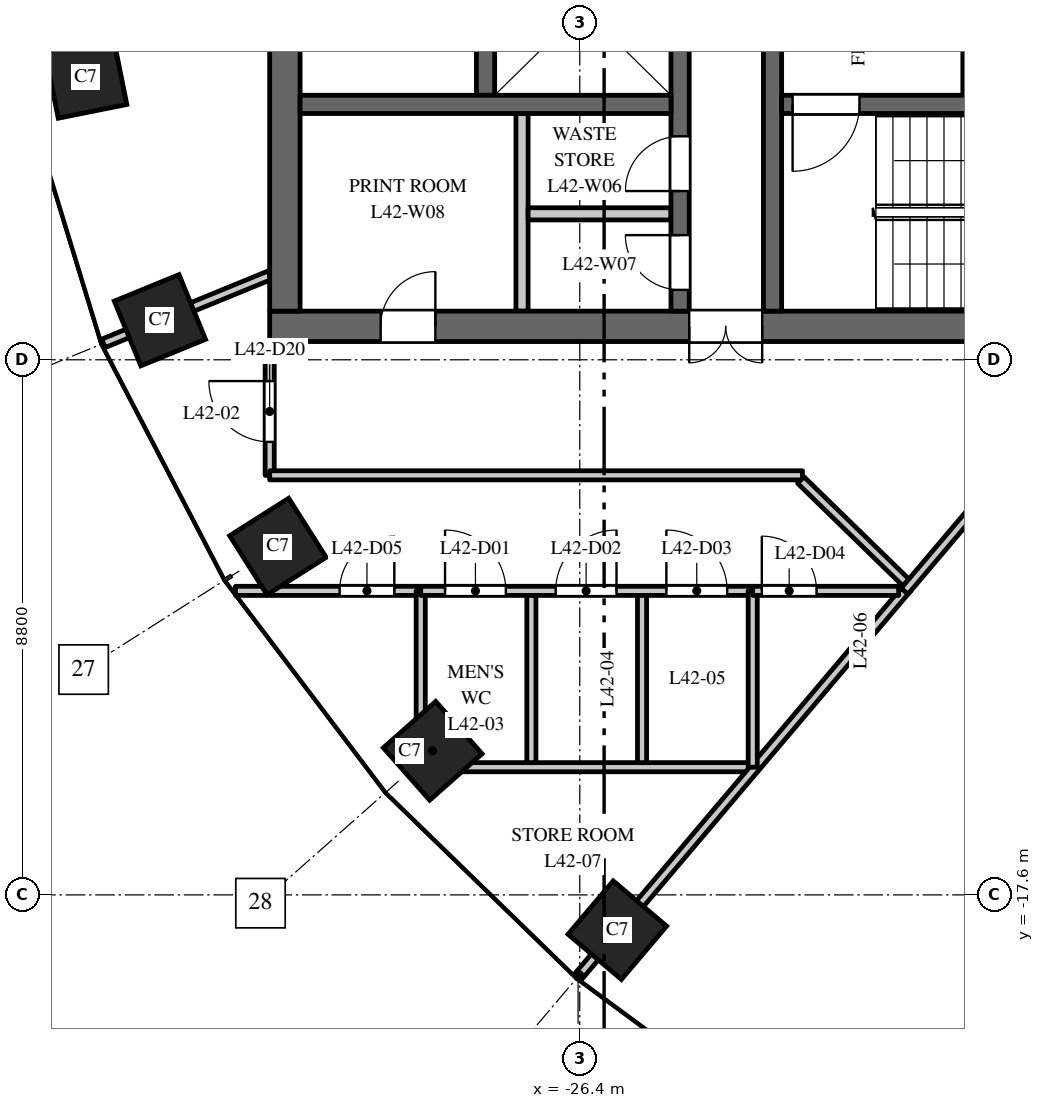
"""IFC4 building model, lengths in metres.
Left out: names, types, materials, properties, quantities, classifications, styles, units other than length and angle.
Written with IfcOpenShell. Run it as: python <this file> out.ifc"""

import sys

from ifc_helpers import new_model, si_unit, direction, frame, frame_2d, origin, origin_2d, place, context, subcontext, project, spatial, rectangle, extrude, element, fill, save


model = new_model("IFC4")
c1 = context("Model", 3, precision=1e-05, world=origin(), true_north=direction((0.0, 1.0)))
c2 = subcontext(c1, "Body", "Model", "MODEL_VIEW")
j1 = project(units=[si_unit("LENGTHUNIT", "METRE"), si_unit("PLANEANGLEUNIT", "RADIAN")], contexts=[c1])
p1 = place(None, origin())
s1 = spatial("IfcSite", under=j1, at=p1, CompositionType="ELEMENT")
p2 = place(p1, origin())
s2 = spatial("IfcBuilding", under=s1, at=p2, CompositionType="ELEMENT")
p3 = place(p2, frame((0.0, 0.0, 182.0)))
s3 = spatial("IfcBuildingStorey", under=s2, at=p3, CompositionType="ELEMENT", Elevation=182.0)
for number, where, z_axis, x_axis in (
    (1, (-34.527, -4.151, 0.0), (0.0, 0.0, 1.0), (0.197, -0.98, 0.0)),
    (2, (-33.305, -8.149, 0.0), (0.0, 0.0, 1.0), (0.379, -0.925, 0.0)),
    (3, (-31.365, -11.871, 0.0), (0.0, 0.0, 1.0), (0.535, -0.845, 0.0)),
    (4, (-28.819, -15.23, 0.0), (0.0, 0.0, 1.0), (0.663, -0.749, 0.0)),
    (5, (-25.783, -18.18, 0.0), (0.0, 0.0, 1.0), (0.763, -0.646, 0.0)),
):
    element("IfcColumn", number, at=place(p3, frame(where, z_axis=z_axis, x_axis=x_axis)), inside=s3, PredefinedType="COLUMN", context=c2, shape_type="SweptSolid", body=[
        extrude(rectangle(XDim=1.15, YDim=1.15, at=origin_2d()), origin(), (0.0, 0.0, 1.0), 4.0),
    ])
p4 = place(p3, frame((-16.5, -8.25, 0.0), z_axis=(0.0, 0.0, 1.0), x_axis=(-1.0, 0.0, 0.0)))
e6 = element("IfcWall", 6, at=p4, inside=s3, PredefinedType="SHEAR", context=c2, shape_type="SweptSolid", body=[
    extrude(rectangle(XDim=15.0, YDim=0.5, at=frame_2d((7.5, 0.0))), origin(), (0.0, 0.0, 1.0), 3.7),
])
p5 = place(p4, frame((6.9, 0.0, 0.0)))
e7 = element("IfcOpeningElement", 7, at=p5, cuts=e6, PredefinedType="OPENING", context=c2, shape_type="SweptSolid", body=[
    extrude(rectangle(XDim=1.2, YDim=2.1, at=frame_2d((0.6, 1.05))), frame((0.0, 0.26, 0.0), z_axis=(0.0, -1.0, 0.0), x_axis=(1.0, 0.0, 0.0)), (0.0, 0.0, 1.0), 0.52),
])
p6 = place(p4, frame((12.275, 0.0, 0.0)))
e8 = element("IfcOpeningElement", 8, at=p6, cuts=e6, PredefinedType="OPENING", context=c2, shape_type="SweptSolid", body=[
    extrude(rectangle(XDim=0.9, YDim=2.1, at=frame_2d((0.45, 1.05))), frame((0.0, 0.26, 0.0), z_axis=(0.0, -1.0, 0.0), x_axis=(1.0, 0.0, 0.0)), (0.0, 0.0, 1.0), 0.52),
])
p7 = place(p3, frame((-27.95, -4.45, 0.0), z_axis=(0.0, 0.0, 1.0), x_axis=(0.0, 1.0, 0.0)))
e9 = element("IfcWall", 9, at=p7, inside=s3, PredefinedType="SHEAR", context=c2, shape_type="SweptSolid", body=[
    extrude(rectangle(XDim=8.9, YDim=0.3, at=frame_2d((4.45, 0.0))), origin(), (0.0, 0.0, 1.0), 3.7),
])
p8 = place(p3, frame((-19.95, -4.45, 0.0), z_axis=(0.0, 0.0, 1.0), x_axis=(0.0, 1.0, 0.0)))
e10 = element("IfcWall", 10, at=p8, inside=s3, PredefinedType="SHEAR", context=c2, shape_type="SweptSolid", body=[
    extrude(rectangle(XDim=8.9, YDim=0.3, at=frame_2d((4.45, 0.0))), origin(), (0.0, 0.0, 1.0), 3.7),
])
p9 = place(p8, frame((0.775, 0.0, 0.0)))
e11 = element("IfcOpeningElement", 11, at=p9, cuts=e10, PredefinedType="OPENING", context=c2, shape_type="SweptSolid", body=[
    extrude(rectangle(XDim=1.2, YDim=2.1, at=frame_2d((0.6, 1.05))), frame((0.0, 0.16, 0.0), z_axis=(0.0, -1.0, 0.0), x_axis=(1.0, 0.0, 0.0)), (0.0, 0.0, 1.0), 0.32),
])
p10 = place(p8, frame((7.25, 0.0, 0.0)))
e12 = element("IfcOpeningElement", 12, at=p10, cuts=e10, PredefinedType="OPENING", context=c2, shape_type="SweptSolid", body=[
    extrude(rectangle(XDim=1.1, YDim=2.1, at=frame_2d((0.55, 1.05))), frame((0.0, 0.16, 0.0), z_axis=(0.0, -1.0, 0.0), x_axis=(1.0, 0.0, 0.0)), (0.0, 0.0, 1.0), 0.32),
])
p11 = place(p3, frame((-24.75, -8.0, 0.0), z_axis=(0.0, 0.0, 1.0), x_axis=(0.0, 1.0, 0.0)))
e13 = element("IfcWall", 13, at=p11, inside=s3, PredefinedType="SHEAR", context=c2, shape_type="SweptSolid", body=[
    extrude(rectangle(XDim=16.0, YDim=0.3, at=frame_2d((8.0, 0.0))), origin(), (0.0, 0.0, 1.0), 3.7),
])
p12 = place(p11, frame((4.425, 0.0, 0.0)))
e14 = element("IfcOpeningElement", 14, at=p12, cuts=e13, PredefinedType="OPENING", context=c2, shape_type="SweptSolid", body=[
    extrude(rectangle(XDim=1.1, YDim=2.1, at=frame_2d((0.55, 1.05))), frame((0.0, 0.16, 0.0), z_axis=(0.0, -1.0, 0.0), x_axis=(1.0, 0.0, 0.0)), (0.0, 0.0, 1.0), 0.32),
])
p13 = place(p11, frame((7.45, 0.0, 0.0)))
e15 = element("IfcOpeningElement", 15, at=p13, cuts=e13, PredefinedType="OPENING", context=c2, shape_type="SweptSolid", body=[
    extrude(rectangle(XDim=1.1, YDim=2.1, at=frame_2d((0.55, 1.05))), frame((0.0, 0.16, 0.0), z_axis=(0.0, -1.0, 0.0), x_axis=(1.0, 0.0, 0.0)), (0.0, 0.0, 1.0), 0.32),
])
p14 = place(p11, frame((10.475, 0.0, 0.0)))
e16 = element("IfcOpeningElement", 16, at=p14, cuts=e13, PredefinedType="OPENING", context=c2, shape_type="SweptSolid", body=[
    extrude(rectangle(XDim=1.1, YDim=2.1, at=frame_2d((0.55, 1.05))), frame((0.0, 0.16, 0.0), z_axis=(0.0, -1.0, 0.0), x_axis=(1.0, 0.0, 0.0)), (0.0, 0.0, 1.0), 0.32),
])
p15 = place(p11, frame((13.75, 0.0, 0.0)))
e17 = element("IfcOpeningElement", 17, at=p15, cuts=e13, PredefinedType="OPENING", context=c2, shape_type="SweptSolid", body=[
    extrude(rectangle(XDim=0.9, YDim=2.1, at=frame_2d((0.45, 1.05))), frame((0.0, 0.16, 0.0), z_axis=(0.0, -1.0, 0.0), x_axis=(1.0, 0.0, 0.0)), (0.0, 0.0, 1.0), 0.32),
])
p16 = place(p11, frame((1.975, 0.0, 0.0)))
e18 = element("IfcOpeningElement", 18, at=p16, cuts=e13, PredefinedType="OPENING", context=c2, shape_type="SweptSolid", body=[
    extrude(rectangle(XDim=0.9, YDim=2.1, at=frame_2d((0.45, 1.05))), frame((0.0, 0.16, 0.0), z_axis=(0.0, -1.0, 0.0), x_axis=(1.0, 0.0, 0.0)), (0.0, 0.0, 1.0), 0.32),
])
p17 = place(p11, frame((0.35, 0.0, 0.0)))
e19 = element("IfcOpeningElement", 19, at=p17, cuts=e13, PredefinedType="OPENING", context=c2, shape_type="SweptSolid", body=[
    extrude(rectangle(XDim=0.9, YDim=2.1, at=frame_2d((0.45, 1.05))), frame((0.0, 0.16, 0.0), z_axis=(0.0, -1.0, 0.0), x_axis=(1.0, 0.0, 0.0)), (0.0, 0.0, 1.0), 0.32),
])
p18 = place(p3, frame((-31.25, -8.0, 0.0), z_axis=(0.0, 0.0, 1.0), x_axis=(0.0, 1.0, 0.0)))
e20 = element("IfcWall", 20, at=p18, inside=s3, PredefinedType="SHEAR", context=c2, shape_type="SweptSolid", body=[
    extrude(rectangle(XDim=16.0, YDim=0.5, at=frame_2d((8.0, 0.0))), origin(), (0.0, 0.0, 1.0), 3.7),
])
p19 = place(p3, frame((-27.35, -8.0, 0.0), z_axis=(0.0, 0.0, 1.0), x_axis=(0.0, 1.0, 0.0)))
e21 = element("IfcWall", 21, at=p19, inside=s3, PredefinedType="PARTITIONING", context=c2, shape_type="SweptSolid", body=[
    extrude(rectangle(XDim=3.25, YDim=0.2, at=frame_2d((1.625, 0.0))), origin(), (0.0, 0.0, 1.0), 3.7),
])
p20 = place(p3, frame((-24.9, -6.4, 0.0), z_axis=(0.0, 0.0, 1.0), x_axis=(-1.0, 0.0, 0.0)))
e22 = element("IfcWall", 22, at=p20, inside=s3, PredefinedType="PARTITIONING", context=c2, shape_type="SweptSolid", body=[
    extrude(rectangle(XDim=2.35, YDim=0.2, at=frame_2d((1.175, 0.0))), origin(), (0.0, 0.0, 1.0), 3.7),
])
p21 = place(p3, frame((-24.9, -4.6, 0.0), z_axis=(0.0, 0.0, 1.0), x_axis=(-1.0, 0.0, 0.0)))
e23 = element("IfcWall", 23, at=p21, inside=s3, PredefinedType="SHEAR", context=c2, shape_type="SweptSolid", body=[
    extrude(rectangle(XDim=6.1, YDim=0.3, at=frame_2d((3.05, 0.0))), origin(), (0.0, 0.0, 1.0), 3.7),
])
p22 = place(p3, frame((-23.23, -8.0, 0.0), z_axis=(0.0, 0.0, 1.0), x_axis=(0.0, 1.0, 0.0)))
e24 = element("IfcWall", 24, at=p22, inside=s3, PredefinedType="SHEAR", context=c2, shape_type="SweptSolid", body=[
    extrude(rectangle(XDim=7.875, YDim=0.3, at=frame_2d((3.938, 0.0))), origin(), (0.0, 0.0, 1.0), 3.7),
])
p23 = place(p22, frame((5.15, 0.0, 0.0)))
e25 = element("IfcOpeningElement", 25, at=p23, cuts=e24, PredefinedType="OPENING", context=c2, shape_type="SweptSolid", body=[
    extrude(rectangle(XDim=1.1, YDim=2.1, at=frame_2d((0.55, 1.05))), frame((0.0, 0.16, 0.0), z_axis=(0.0, -1.0, 0.0), x_axis=(1.0, 0.0, 0.0)), (0.0, 0.0, 1.0), 0.32),
])
p24 = place(p3, frame((-16.9, -4.6, 0.0), z_axis=(0.0, 0.0, 1.0), x_axis=(-1.0, 0.0, 0.0)))
e26 = element("IfcWall", 26, at=p24, inside=s3, PredefinedType="SHEAR", context=c2, shape_type="SweptSolid", body=[
    extrude(rectangle(XDim=6.18, YDim=0.3, at=frame_2d((3.09, 0.0))), origin(), (0.0, 0.0, 1.0), 3.7),
])
p25 = place(p24, frame((4.9, 0.0, 0.0)))
e27 = element("IfcOpeningElement", 27, at=p25, cuts=e26, PredefinedType="OPENING", context=c2, shape_type="SweptSolid", body=[
    extrude(rectangle(XDim=1.1, YDim=2.1, at=frame_2d((0.55, 1.05))), frame((0.0, 0.16, 0.0), z_axis=(0.0, -1.0, 0.0), x_axis=(1.0, 0.0, 0.0)), (0.0, 0.0, 1.0), 0.32),
])
p26 = place(p3, frame((-34.234, -8.53, 0.0), z_axis=(0.0, 0.0, 1.0), x_axis=(0.925344112436, 0.379128307542, 0.0)))
e28 = element("IfcWall", 28, at=p26, inside=s3, PredefinedType="PARTITIONING", context=c2, shape_type="SweptSolid", body=[
    extrude(rectangle(XDim=2.954, YDim=0.15, at=frame_2d((1.477, 0.0))), origin(), (0.0, 0.0, 1.0), 2.9),
])
p27 = place(p3, frame((-32.063, -12.6, 0.0), z_axis=(0.0, 0.0, 1.0), x_axis=(1.0, 0.0, 0.0)))
e29 = element("IfcWall", 29, at=p27, inside=s3, PredefinedType="PARTITIONING", context=c2, shape_type="SweptSolid", body=[
    extrude(rectangle(XDim=3.047, YDim=0.15, at=frame_2d((1.523, 0.0))), origin(), (0.0, 0.0, 1.0), 2.9),
])
p28 = place(p27, frame((1.713, 0.0, 0.0)))
e30 = element("IfcOpeningElement", 30, at=p28, cuts=e29, PredefinedType="OPENING", context=c2, shape_type="SweptSolid", body=[
    extrude(rectangle(XDim=0.9, YDim=2.1, at=frame_2d((0.45, 1.05))), frame((0.0, 0.085, 0.0), z_axis=(0.0, -1.0, 0.0), x_axis=(1.0, 0.0, 0.0)), (0.0, 0.0, 1.0), 0.17),
])
p29 = place(p3, frame((-31.5, -10.7, 0.0), z_axis=(0.0, 0.0, 1.0), x_axis=(0.0, 1.0, 0.0)))
e31 = element("IfcWall", 31, at=p29, inside=s3, PredefinedType="PARTITIONING", context=c2, shape_type="SweptSolid", body=[
    extrude(rectangle(XDim=2.2, YDim=0.15, at=frame_2d((1.1, 0.0))), origin(), (0.0, 0.0, 1.0), 3.7),
])
p30 = place(p29, frame((0.55, 0.0, 0.0)))
e32 = element("IfcOpeningElement", 32, at=p30, cuts=e31, PredefinedType="OPENING", context=c2, shape_type="SweptSolid", body=[
    extrude(rectangle(XDim=1.0, YDim=2.1, at=frame_2d((0.5, 1.05))), frame((0.0, 0.085, 0.0), z_axis=(0.0, -1.0, 0.0), x_axis=(1.0, 0.0, 0.0)), (0.0, 0.0, 1.0), 0.17),
])
p31 = place(p3, frame((-31.5, -10.7, 0.0), z_axis=(0.0, 0.0, 1.0), x_axis=(1.0, 0.0, 0.0)))
e33 = element("IfcWall", 33, at=p31, inside=s3, PredefinedType="PARTITIONING", context=c2, shape_type="SweptSolid", body=[
    extrude(rectangle(XDim=8.762, YDim=0.15, at=frame_2d((4.381, 0.0))), origin(), (0.0, 0.0, 1.0), 3.1),
])
p32 = place(p3, frame((-29.016, -15.496, 0.0), z_axis=(0.0, 0.0, 1.0), x_axis=(0.0, 1.0, 0.0)))
e34 = element("IfcWall", 34, at=p32, inside=s3, PredefinedType="PARTITIONING", context=c2, shape_type="SweptSolid", body=[
    extrude(rectangle(XDim=2.896, YDim=0.15, at=frame_2d((1.448, 0.0))), origin(), (0.0, 0.0, 1.0), 2.9),
])
p33 = place(p3, frame((-29.016, -12.6, 0.0), z_axis=(0.0, 0.0, 1.0), x_axis=(1.0, 0.0, 0.0)))
e35 = element("IfcWall", 35, at=p33, inside=s3, PredefinedType="PARTITIONING", context=c2, shape_type="SweptSolid", body=[
    extrude(rectangle(XDim=5.46, YDim=0.15, at=frame_2d((2.73, 0.0))), origin(), (0.0, 0.0, 1.0), 3.7),
])
p34 = place(p33, frame((0.4, 0.0, 0.0)))
e36 = element("IfcOpeningElement", 36, at=p34, cuts=e35, PredefinedType="OPENING", context=c2, shape_type="SweptSolid", body=[
    extrude(rectangle(XDim=1.0, YDim=2.1, at=frame_2d((0.5, 1.05))), frame((0.0, 0.085, 0.0), z_axis=(0.0, -1.0, 0.0), x_axis=(1.0, 0.0, 0.0)), (0.0, 0.0, 1.0), 0.17),
])
p35 = place(p33, frame((2.22, 0.0, 0.0)))
e37 = element("IfcOpeningElement", 37, at=p35, cuts=e35, PredefinedType="OPENING", context=c2, shape_type="SweptSolid", body=[
    extrude(rectangle(XDim=1.0, YDim=2.1, at=frame_2d((0.5, 1.05))), frame((0.0, 0.085, 0.0), z_axis=(0.0, -1.0, 0.0), x_axis=(1.0, 0.0, 0.0)), (0.0, 0.0, 1.0), 0.17),
])
p36 = place(p33, frame((4.04, 0.0, 0.0)))
e38 = element("IfcOpeningElement", 38, at=p36, cuts=e35, PredefinedType="OPENING", context=c2, shape_type="SweptSolid", body=[
    extrude(rectangle(XDim=1.0, YDim=2.1, at=frame_2d((0.5, 1.05))), frame((0.0, 0.085, 0.0), z_axis=(0.0, -1.0, 0.0), x_axis=(1.0, 0.0, 0.0)), (0.0, 0.0, 1.0), 0.17),
])
p37 = place(p3, frame((-29.012, -15.5, 0.0), z_axis=(0.0, 0.0, 1.0), x_axis=(1.0, 0.0, 0.0)))
e39 = element("IfcWall", 39, at=p37, inside=s3, PredefinedType="PARTITIONING", context=c2, shape_type="SweptSolid", body=[
    extrude(rectangle(XDim=5.456, YDim=0.15, at=frame_2d((2.728, 0.0))), origin(), (0.0, 0.0, 1.0), 2.9),
])
p38 = place(p3, frame((-27.196, -15.425, 0.0), z_axis=(0.0, 0.0, 1.0), x_axis=(0.0, 1.0, 0.0)))
e40 = element("IfcWall", 40, at=p38, inside=s3, PredefinedType="PARTITIONING", context=c2, shape_type="SweptSolid", body=[
    extrude(rectangle(XDim=2.75, YDim=0.15, at=frame_2d((1.375, 0.0))), origin(), (0.0, 0.0, 1.0), 3.7),
])
p39 = place(p3, frame((-26.428, -18.946, 0.0), z_axis=(0.0, 0.0, 1.0), x_axis=(0.646259235329, 0.763117946816, 0.0)))
e41 = element("IfcWall", 41, at=p39, inside=s3, PredefinedType="PARTITIONING", context=c2, shape_type="SweptSolid", body=[
    extrude(rectangle(XDim=8.388, YDim=0.15, at=frame_2d((4.194, 0.0))), origin(), (0.0, 0.0, 1.0), 2.75),
])
p40 = place(p3, frame((-25.376, -15.425, 0.0), z_axis=(0.0, 0.0, 1.0), x_axis=(0.0, 1.0, 0.0)))
e42 = element("IfcWall", 42, at=p40, inside=s3, PredefinedType="PARTITIONING", context=c2, shape_type="SweptSolid", body=[
    extrude(rectangle(XDim=2.75, YDim=0.15, at=frame_2d((1.375, 0.0))), origin(), (0.0, 0.0, 1.0), 3.7),
])
p41 = place(p3, frame((-23.556, -15.5, 0.0), z_axis=(0.0, 0.0, 1.0), x_axis=(0.0, 1.0, 0.0)))
e43 = element("IfcWall", 43, at=p41, inside=s3, PredefinedType="PARTITIONING", context=c2, shape_type="SweptSolid", body=[
    extrude(rectangle(XDim=2.9, YDim=0.15, at=frame_2d((1.45, 0.0))), origin(), (0.0, 0.0, 1.0), 3.7),
])
p42 = place(p3, frame((-23.556, -12.6, 0.0), z_axis=(0.0, 0.0, 1.0), x_axis=(1.0, 0.0, 0.0)))
e44 = element("IfcWall", 44, at=p42, inside=s3, PredefinedType="PARTITIONING", context=c2, shape_type="SweptSolid", body=[
    extrude(rectangle(XDim=2.4, YDim=0.15, at=frame_2d((1.2, 0.0))), origin(), (0.0, 0.0, 1.0), 3.7),
])
p43 = place(p42, frame((0.15, 0.0, 0.0)))
e45 = element("IfcOpeningElement", 45, at=p43, cuts=e44, PredefinedType="OPENING", context=c2, shape_type="SweptSolid", body=[
    extrude(rectangle(XDim=0.9, YDim=2.1, at=frame_2d((0.45, 1.05))), frame((0.0, 0.085, 0.0), z_axis=(0.0, -1.0, 0.0), x_axis=(1.0, 0.0, 0.0)), (0.0, 0.0, 1.0), 0.17),
])
p44 = place(p3, frame((-22.765, -10.778, 0.0), z_axis=(0.0, 0.0, 1.0), x_axis=(0.716199777284, -0.69789532096, 0.0)))
e46 = element("IfcWall", 46, at=p44, inside=s3, PredefinedType="PARTITIONING", context=c2, shape_type="SweptSolid", body=[
    extrude(rectangle(XDim=2.414, YDim=0.15, at=frame_2d((1.207, 0.0))), origin(), (0.0, 0.0, 1.0), 3.7),
])
p45 = place(p3, frame((-21.058, -12.605, 0.0), z_axis=(0.0, 0.0, 1.0), x_axis=(0.646427819344, 0.762975146632, 0.0)))
e47 = element("IfcWall", 47, at=p45, inside=s3, PredefinedType="PARTITIONING", context=c2, shape_type="SweptSolid", body=[
    extrude(rectangle(XDim=2.591, YDim=0.15, at=frame_2d((1.296, 0.0))), origin(), (0.0, 0.0, 1.0), 3.7),
])
p46 = place(p25, origin())
e48 = element("IfcDoor", 48, at=p46, inside=s3, OperationType="SINGLE_SWING_LEFT", PredefinedType="DOOR", context=c2, shape_type="SweptSolid", body=[
    extrude(rectangle(XDim=1.1, YDim=2.1, at=frame_2d((0.55, 1.05))), frame((0.0, 0.025, 0.0), z_axis=(0.0, -1.0, 0.0), x_axis=(1.0, 0.0, 0.0)), (0.0, 0.0, 1.0), 0.05),
])
fill(e27, e48)
p47 = place(p5, origin())
e49 = element("IfcDoor", 49, at=p47, inside=s3, OperationType="DOUBLE_DOOR_DOUBLE_SWING", PredefinedType="DOOR", context=c2, shape_type="SweptSolid", body=[
    extrude(rectangle(XDim=1.2, YDim=2.1, at=frame_2d((0.6, 1.05))), frame((0.0, 0.025, 0.0), z_axis=(0.0, -1.0, 0.0), x_axis=(1.0, 0.0, 0.0)), (0.0, 0.0, 1.0), 0.05),
])
fill(e7, e49)
p48 = place(p16, origin())
e50 = element("IfcDoor", 50, at=p48, inside=s3, OperationType="SINGLE_SWING_RIGHT", PredefinedType="DOOR", context=c2, shape_type="SweptSolid", body=[
    extrude(rectangle(XDim=0.9, YDim=2.1, at=frame_2d((0.45, 1.05))), frame((0.0, 0.025, 0.0), z_axis=(0.0, -1.0, 0.0), x_axis=(1.0, 0.0, 0.0)), (0.0, 0.0, 1.0), 0.05),
])
fill(e18, e50)
p49 = place(p17, origin())
e51 = element("IfcDoor", 51, at=p49, inside=s3, OperationType="SINGLE_SWING_LEFT", PredefinedType="DOOR", context=c2, shape_type="SweptSolid", body=[
    extrude(rectangle(XDim=0.9, YDim=2.1, at=frame_2d((0.45, 1.05))), frame((0.0, 0.025, 0.0), z_axis=(0.0, -1.0, 0.0), x_axis=(1.0, 0.0, 0.0)), (0.0, 0.0, 1.0), 0.05),
])
fill(e19, e51)
p50 = place(p6, origin())
e52 = element("IfcDoor", 52, at=p50, inside=s3, OperationType="SINGLE_SWING_LEFT", PredefinedType="DOOR", context=c2, shape_type="SweptSolid", body=[
    extrude(rectangle(XDim=0.9, YDim=2.1, at=frame_2d((0.45, 1.05))), frame((0.0, 0.025, 0.0), z_axis=(0.0, -1.0, 0.0), x_axis=(1.0, 0.0, 0.0)), (0.0, 0.0, 1.0), 0.05),
])
fill(e8, e52)
p51 = place(p34, origin())
e53 = element("IfcDoor", 53, at=p51, inside=s3, OperationType="SINGLE_SWING_LEFT", PredefinedType="DOOR", context=c2, shape_type="SweptSolid", body=[
    extrude(rectangle(XDim=1.0, YDim=2.1, at=frame_2d((0.5, 1.05))), frame((0.0, 0.025, 0.0), z_axis=(0.0, -1.0, 0.0), x_axis=(1.0, 0.0, 0.0)), (0.0, 0.0, 1.0), 0.05),
])
fill(e36, e53)
p52 = place(p35, origin())
e54 = element("IfcDoor", 54, at=p52, inside=s3, OperationType="SINGLE_SWING_RIGHT", PredefinedType="DOOR", context=c2, shape_type="SweptSolid", body=[
    extrude(rectangle(XDim=1.0, YDim=2.1, at=frame_2d((0.5, 1.05))), frame((0.0, 0.025, 0.0), z_axis=(0.0, -1.0, 0.0), x_axis=(1.0, 0.0, 0.0)), (0.0, 0.0, 1.0), 0.05),
])
fill(e37, e54)
p53 = place(p36, origin())
e55 = element("IfcDoor", 55, at=p53, inside=s3, OperationType="SINGLE_SWING_LEFT", PredefinedType="DOOR", context=c2, shape_type="SweptSolid", body=[
    extrude(rectangle(XDim=1.0, YDim=2.1, at=frame_2d((0.5, 1.05))), frame((0.0, 0.025, 0.0), z_axis=(0.0, -1.0, 0.0), x_axis=(1.0, 0.0, 0.0)), (0.0, 0.0, 1.0), 0.05),
])
fill(e38, e55)
p54 = place(p43, origin())
e56 = element("IfcDoor", 56, at=p54, inside=s3, OperationType="SINGLE_SWING_LEFT", PredefinedType="DOOR", context=c2, shape_type="SweptSolid", body=[
    extrude(rectangle(XDim=0.9, YDim=2.1, at=frame_2d((0.45, 1.05))), frame((0.0, 0.025, 0.0), z_axis=(0.0, -1.0, 0.0), x_axis=(1.0, 0.0, 0.0)), (0.0, 0.0, 1.0), 0.05),
])
fill(e45, e56)
p55 = place(p28, origin())
e57 = element("IfcDoor", 57, at=p55, inside=s3, OperationType="SINGLE_SWING_RIGHT", PredefinedType="DOOR", context=c2, shape_type="SweptSolid", body=[
    extrude(rectangle(XDim=0.9, YDim=2.1, at=frame_2d((0.45, 1.05))), frame((0.0, 0.025, 0.0), z_axis=(0.0, -1.0, 0.0), x_axis=(1.0, 0.0, 0.0)), (0.0, 0.0, 1.0), 0.05),
])
fill(e30, e57)
p56 = place(p30, origin())
e58 = element("IfcDoor", 58, at=p56, inside=s3, OperationType="SINGLE_SWING_RIGHT", PredefinedType="DOOR", context=c2, shape_type="SweptSolid", body=[
    extrude(rectangle(XDim=1.0, YDim=2.1, at=frame_2d((0.5, 1.05))), frame((0.0, 0.025, 0.0), z_axis=(0.0, -1.0, 0.0), x_axis=(1.0, 0.0, 0.0)), (0.0, 0.0, 1.0), 0.05),
])
fill(e32, e58)
save(model, sys.argv[1])
